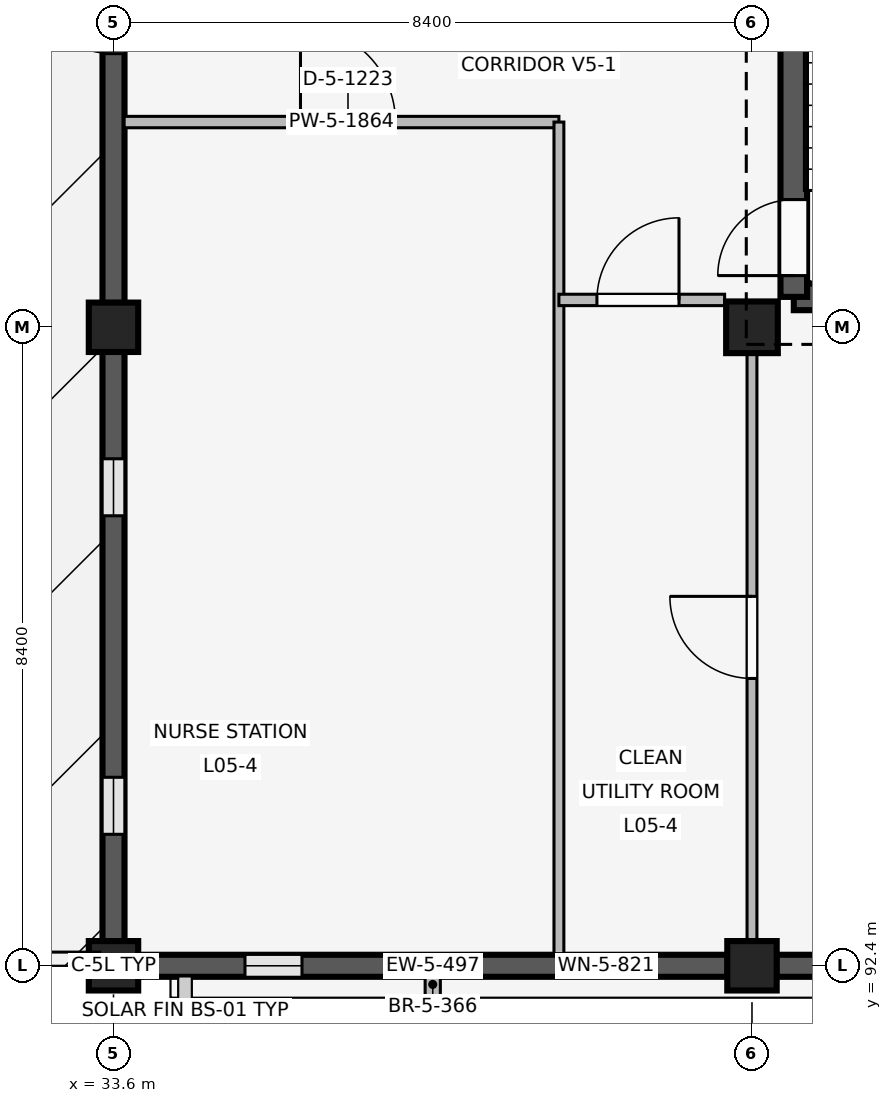
"""IFC4 building model, lengths in metres.
Left out: names, types, materials, properties, quantities, classifications, styles, units other than length and angle.
Written with IfcOpenShell. Run it as: python <this file> out.ifc"""

import sys

from ifc_helpers import new_model, si_unit, direction, frame, frame_2d, origin, origin_2d, place, context, subcontext, project, spatial, rectangle, extrude, element, fill, save


model = new_model("IFC4")
c1 = context("Model", 3, precision=1e-05, world=origin(), true_north=direction((0.0, 1.0)))
c2 = subcontext(c1, "Body", "Model", "MODEL_VIEW")
j1 = project(units=[si_unit("LENGTHUNIT", "METRE"), si_unit("PLANEANGLEUNIT", "RADIAN")], contexts=[c1])
p1 = place(None, origin())
s1 = spatial("IfcSite", under=j1, at=p1, CompositionType="ELEMENT")
p2 = place(p1, origin())
s2 = spatial("IfcBuilding", under=s1, at=p2, CompositionType="ELEMENT")
p3 = place(p2, frame((0.0, 0.0, 20.4)))
s3 = spatial("IfcBuildingStorey", under=s2, at=p3, CompositionType="ELEMENT", Elevation=20.4)
for number, where, z_axis, x_axis in (
    (1, (33.6, 92.4, 0.0), (0.0, 0.0, 1.0), (1.0, 0.0, 0.0)),
    (2, (33.6, 100.8, 0.0), (0.0, 0.0, 1.0), (1.0, 0.0, 0.0)),
    (3, (42.0, 92.4, 0.0), (0.0, 0.0, 1.0), (1.0, 0.0, 0.0)),
):
    element("IfcColumn", number, at=place(p3, frame(where, z_axis=z_axis, x_axis=x_axis)), inside=s3, PredefinedType="COLUMN", context=c2, shape_type="SweptSolid", body=[
        extrude(rectangle(XDim=0.65, YDim=0.65, at=origin_2d()), origin(), (0.0, 0.0, 1.0), 4.2),
    ])
p4 = place(p3, frame((42.0, 100.8, 0.0), z_axis=(0.0, 0.0, 1.0), x_axis=(1.0, 0.0, 0.0)))
e4 = element("IfcColumn", 4, at=p4, inside=s3, PredefinedType="COLUMN", context=c2, shape_type="SweptSolid", body=[
    extrude(rectangle(XDim=0.68, YDim=0.68, at=origin_2d()), origin(), (0.0, 0.0, 1.0), 4.2),
])
p5 = place(p3, frame((41.68, 92.4, 0.0), z_axis=(0.0, 0.0, 1.0), x_axis=(-1.0, 0.0, 0.0)))
e5 = element("IfcWall", 5, at=p5, inside=s3, PredefinedType="SOLIDWALL", context=c2, shape_type="SweptSolid", body=[
    extrude(rectangle(XDim=7.76, YDim=0.29, at=frame_2d((3.88, 0.0))), origin(), (0.0, 0.0, 1.0), 3.34),
])
p6 = place(p5, frame((1.225, 0.0, 0.85)))
e6 = element("IfcOpeningElement", 6, at=p6, cuts=e5, PredefinedType="OPENING", context=c2, shape_type="SweptSolid", body=[
    extrude(rectangle(XDim=0.75, YDim=1.85, at=frame_2d((0.375, 0.925))), frame((0.0, 0.155, 0.0), z_axis=(0.0, -1.0, 0.0), x_axis=(1.0, 0.0, 0.0)), (0.0, 0.0, 1.0), 0.31),
])
p7 = place(p5, frame((5.6, 0.0, 0.85)))
e7 = element("IfcOpeningElement", 7, at=p7, cuts=e5, PredefinedType="OPENING", context=c2, shape_type="SweptSolid", body=[
    extrude(rectangle(XDim=0.75, YDim=1.85, at=frame_2d((0.375, 0.925))), frame((0.0, 0.155, 0.0), z_axis=(0.0, -1.0, 0.0), x_axis=(1.0, 0.0, 0.0)), (0.0, 0.0, 1.0), 0.31),
])
p8 = place(p3, frame((37.8, 92.325, 0.0), z_axis=(0.0, 0.0, 1.0), x_axis=(0.0, -1.0, 0.0)))
e8 = element("IfcWall", 8, at=p8, inside=s3, PredefinedType="ELEMENTEDWALL", context=c2, shape_type="SweptSolid", body=[
    extrude(rectangle(XDim=0.34, YDim=0.2, at=frame_2d((0.17, 0.0))), origin(), (0.0, 0.0, 1.0), 3.32),
])
p9 = place(p3, frame((33.6, 92.72, 0.0), z_axis=(0.0, 0.0, 1.0), x_axis=(0.0, 1.0, 0.0)))
e9 = element("IfcWall", 9, at=p9, inside=s3, PredefinedType="SOLIDWALL", context=c2, shape_type="SweptSolid", body=[
    extrude(rectangle(XDim=7.76, YDim=0.29, at=frame_2d((3.88, 0.0))), origin(), (0.0, 0.0, 1.0), 3.34),
])
p10 = place(p9, frame((1.41, 0.0, 0.85)))
e10 = element("IfcOpeningElement", 10, at=p10, cuts=e9, PredefinedType="OPENING", context=c2, shape_type="SweptSolid", body=[
    extrude(rectangle(XDim=0.75, YDim=1.85, at=frame_2d((0.375, 0.925))), frame((0.0, 0.155, 0.0), z_axis=(0.0, -1.0, 0.0), x_axis=(1.0, 0.0, 0.0)), (0.0, 0.0, 1.0), 0.31),
])
p11 = place(p9, frame((5.6, 0.0, 0.85)))
e11 = element("IfcOpeningElement", 11, at=p11, cuts=e9, PredefinedType="OPENING", context=c2, shape_type="SweptSolid", body=[
    extrude(rectangle(XDim=0.75, YDim=1.85, at=frame_2d((0.375, 0.925))), frame((0.0, 0.155, 0.0), z_axis=(0.0, -1.0, 0.0), x_axis=(1.0, 0.0, 0.0)), (0.0, 0.0, 1.0), 0.31),
])
p12 = place(p3, frame((33.6, 101.12, 0.0), z_axis=(0.0, 0.0, 1.0), x_axis=(0.0, 1.0, 0.0)))
e12 = element("IfcWall", 12, at=p12, inside=s3, PredefinedType="SOLIDWALL", context=c2, shape_type="SweptSolid", body=[
    extrude(rectangle(XDim=7.76, YDim=0.29, at=frame_2d((3.88, 0.0))), origin(), (0.0, 0.0, 1.0), 3.34),
])
p13 = place(p12, frame((3.28, 0.0, 0.0)))
e13 = element("IfcOpeningElement", 13, at=p13, cuts=e12, PredefinedType="OPENING", context=c2, shape_type="SweptSolid", body=[
    extrude(rectangle(XDim=1.2, YDim=2.25, at=frame_2d((0.6, 1.125))), frame((0.0, 0.155, 0.0), z_axis=(0.0, -1.0, 0.0), x_axis=(1.0, 0.0, 0.0)), (0.0, 0.0, 1.0), 0.31),
])
p14 = place(p3, frame((50.08, 92.4, 0.0), z_axis=(0.0, 0.0, 1.0), x_axis=(-1.0, 0.0, 0.0)))
e14 = element("IfcWall", 14, at=p14, inside=s3, PredefinedType="SOLIDWALL", context=c2, shape_type="SweptSolid", body=[
    extrude(rectangle(XDim=7.76, YDim=0.29, at=frame_2d((3.88, 0.0))), origin(), (0.0, 0.0, 1.0), 3.34),
])
p15 = place(p14, frame((1.46, 0.0, 0.85)))
e15 = element("IfcOpeningElement", 15, at=p15, cuts=e14, PredefinedType="OPENING", context=c2, shape_type="SweptSolid", body=[
    extrude(rectangle(XDim=0.65, YDim=1.75, at=frame_2d((0.325, 0.875))), frame((0.0, 0.155, 0.0), z_axis=(0.0, -1.0, 0.0), x_axis=(1.0, 0.0, 0.0)), (0.0, 0.0, 1.0), 0.31),
])
p16 = place(p14, frame((5.65, 0.0, 0.85)))
e16 = element("IfcOpeningElement", 16, at=p16, cuts=e14, PredefinedType="OPENING", context=c2, shape_type="SweptSolid", body=[
    extrude(rectangle(XDim=0.65, YDim=1.75, at=frame_2d((0.325, 0.875))), frame((0.0, 0.155, 0.0), z_axis=(0.0, -1.0, 0.0), x_axis=(1.0, 0.0, 0.0)), (0.0, 0.0, 1.0), 0.31),
])
p17 = place(p3, frame((42.55, 101.2, 0.0), z_axis=(0.0, 0.0, 1.0), x_axis=(1.0, 0.0, 0.0)))
e17 = element("IfcWall", 17, at=p17, inside=s3, PredefinedType="SHEAR", context=c2, shape_type="SweptSolid", body=[
    extrude(rectangle(XDim=7.5, YDim=0.35, at=frame_2d((3.75, 0.0))), origin(), (0.0, 0.0, 1.0), 3.92),
])
p18 = place(p17, frame((4.85, 0.0, 0.0)))
e18 = element("IfcOpeningElement", 18, at=p18, cuts=e17, PredefinedType="OPENING", context=c2, shape_type="SweptSolid", body=[
    extrude(rectangle(XDim=1.2, YDim=2.2, at=frame_2d((0.6, 1.1))), frame((0.0, 0.185, 0.0), z_axis=(0.0, -1.0, 0.0), x_axis=(1.0, 0.0, 0.0)), (0.0, 0.0, 1.0), 0.37),
])
p19 = place(p3, frame((42.55, 101.2, 0.0), z_axis=(0.0, 0.0, 1.0), x_axis=(0.0, 1.0, 0.0)))
e19 = element("IfcWall", 19, at=p19, inside=s3, PredefinedType="SHEAR", context=c2, shape_type="SweptSolid", body=[
    extrude(rectangle(XDim=7.55, YDim=0.35, at=frame_2d((3.775, 0.0))), origin(), (0.0, 0.0, 1.0), 3.92),
])
p20 = place(p19, frame((0.28, 0.0, 0.0)))
e20 = element("IfcOpeningElement", 20, at=p20, cuts=e19, PredefinedType="OPENING", context=c2, shape_type="SweptSolid", body=[
    extrude(rectangle(XDim=1.0, YDim=2.15, at=frame_2d((0.5, 1.075))), frame((0.0, 0.185, 0.0), z_axis=(0.0, -1.0, 0.0), x_axis=(1.0, 0.0, 0.0)), (0.0, 0.0, 1.0), 0.37),
])
p21 = place(p3, frame((33.74, 103.5, 0.0), z_axis=(0.0, 0.0, 1.0), x_axis=(1.0, 0.0, 0.0)))
e21 = element("IfcWall", 21, at=p21, inside=s3, PredefinedType="PARTITIONING", context=c2, shape_type="SweptSolid", body=[
    extrude(rectangle(XDim=5.72, YDim=0.15, at=frame_2d((2.86, 0.0))), origin(), (0.0, 0.0, 1.0), 3.32),
])
p22 = place(p21, frame((2.32, 0.0, 0.0)))
e22 = element("IfcOpeningElement", 22, at=p22, cuts=e21, PredefinedType="OPENING", context=c2, shape_type="SweptSolid", body=[
    extrude(rectangle(XDim=1.25, YDim=2.2, at=frame_2d((0.625, 1.1))), frame((0.0, 0.085, 0.0), z_axis=(0.0, -1.0, 0.0), x_axis=(1.0, 0.0, 0.0)), (0.0, 0.0, 1.0), 0.17),
])
p23 = place(p3, frame((39.46, 92.56, 0.0), z_axis=(0.0, 0.0, 1.0), x_axis=(0.0, 1.0, 0.0)))
e23 = element("IfcWall", 23, at=p23, inside=s3, PredefinedType="PARTITIONING", context=c2, shape_type="SweptSolid", body=[
    extrude(rectangle(XDim=10.94, YDim=0.13, at=frame_2d((5.47, 0.0))), origin(), (0.0, 0.0, 1.0), 3.32),
])
p24 = place(p3, frame((39.46, 101.16, 0.0), z_axis=(0.0, 0.0, 1.0), x_axis=(1.0, 0.0, 0.0)))
e24 = element("IfcWall", 24, at=p24, inside=s3, PredefinedType="PARTITIONING", context=c2, shape_type="SweptSolid", body=[
    extrude(rectangle(XDim=2.18, YDim=0.15, at=frame_2d((1.09, 0.0))), origin(), (0.0, 0.0, 1.0), 3.32),
])
p25 = place(p24, frame((0.5, 0.0, 0.0)))
e25 = element("IfcOpeningElement", 25, at=p25, cuts=e24, PredefinedType="OPENING", context=c2, shape_type="SweptSolid", body=[
    extrude(rectangle(XDim=1.08, YDim=2.15, at=frame_2d((0.54, 1.075))), frame((0.0, 0.085, 0.0), z_axis=(0.0, -1.0, 0.0), x_axis=(1.0, 0.0, 0.0)), (0.0, 0.0, 1.0), 0.17),
])
p26 = place(p3, frame((42.0, 92.54, 0.0), z_axis=(0.0, 0.0, 1.0), x_axis=(0.0, 1.0, 0.0)))
e26 = element("IfcWall", 26, at=p26, inside=s3, PredefinedType="PARTITIONING", context=c2, shape_type="SweptSolid", body=[
    extrude(rectangle(XDim=8.21, YDim=0.13, at=frame_2d((4.105, 0.0))), origin(), (0.0, 0.0, 1.0), 3.32),
])
p27 = place(p26, frame((3.64, 0.0, 0.0)))
e27 = element("IfcOpeningElement", 27, at=p27, cuts=e26, PredefinedType="OPENING", context=c2, shape_type="SweptSolid", body=[
    extrude(rectangle(XDim=1.08, YDim=2.15, at=frame_2d((0.54, 1.075))), frame((0.0, 0.075, 0.0), z_axis=(0.0, -1.0, 0.0), x_axis=(1.0, 0.0, 0.0)), (0.0, 0.0, 1.0), 0.15),
])
p28 = place(p6, origin())
e28 = element("IfcWindow", 28, at=p28, inside=s3, PartitioningType="SINGLE_PANEL", PredefinedType="WINDOW", context=c2, shape_type="SweptSolid", body=[
    extrude(rectangle(XDim=0.75, YDim=1.85, at=frame_2d((0.375, 0.925))), frame((0.0, 0.03, 0.0), z_axis=(0.0, -1.0, 0.0), x_axis=(1.0, 0.0, 0.0)), (0.0, 0.0, 1.0), 0.06),
])
fill(e6, e28)
p29 = place(p7, origin())
e29 = element("IfcWindow", 29, at=p29, inside=s3, PartitioningType="SINGLE_PANEL", PredefinedType="WINDOW", context=c2, shape_type="SweptSolid", body=[
    extrude(rectangle(XDim=0.75, YDim=1.85, at=frame_2d((0.375, 0.925))), frame((0.0, 0.03, 0.0), z_axis=(0.0, -1.0, 0.0), x_axis=(1.0, 0.0, 0.0)), (0.0, 0.0, 1.0), 0.06),
])
fill(e7, e29)
p30 = place(p10, origin())
e30 = element("IfcWindow", 30, at=p30, inside=s3, PartitioningType="SINGLE_PANEL", PredefinedType="WINDOW", context=c2, shape_type="SweptSolid", body=[
    extrude(rectangle(XDim=0.75, YDim=1.85, at=frame_2d((0.375, 0.925))), frame((0.0, 0.03, 0.0), z_axis=(0.0, -1.0, 0.0), x_axis=(1.0, 0.0, 0.0)), (0.0, 0.0, 1.0), 0.06),
])
fill(e10, e30)
p31 = place(p11, origin())
e31 = element("IfcWindow", 31, at=p31, inside=s3, PartitioningType="SINGLE_PANEL", PredefinedType="WINDOW", context=c2, shape_type="SweptSolid", body=[
    extrude(rectangle(XDim=0.75, YDim=1.85, at=frame_2d((0.375, 0.925))), frame((0.0, 0.03, 0.0), z_axis=(0.0, -1.0, 0.0), x_axis=(1.0, 0.0, 0.0)), (0.0, 0.0, 1.0), 0.06),
])
fill(e11, e31)
p32 = place(p13, origin())
e32 = element("IfcDoor", 32, at=p32, inside=s3, OperationType="SINGLE_SWING_RIGHT", PredefinedType="DOOR", context=c2, shape_type="SweptSolid", body=[
    extrude(rectangle(XDim=1.2, YDim=2.25, at=frame_2d((0.6, 1.125))), frame((0.0, 0.025, 0.0), z_axis=(0.0, -1.0, 0.0), x_axis=(1.0, 0.0, 0.0)), (0.0, 0.0, 1.0), 0.05),
])
fill(e13, e32)
p33 = place(p20, origin())
e33 = element("IfcDoor", 33, at=p33, inside=s3, OperationType="SINGLE_SWING_LEFT", PredefinedType="DOOR", context=c2, shape_type="SweptSolid", body=[
    extrude(rectangle(XDim=1.0, YDim=2.15, at=frame_2d((0.5, 1.075))), frame((0.0, 0.025, 0.0), z_axis=(0.0, -1.0, 0.0), x_axis=(1.0, 0.0, 0.0)), (0.0, 0.0, 1.0), 0.05),
])
fill(e20, e33)
p34 = place(p22, origin())
e34 = element("IfcDoor", 34, at=p34, inside=s3, OperationType="SINGLE_SWING_LEFT", PredefinedType="DOOR", context=c2, shape_type="SweptSolid", body=[
    extrude(rectangle(XDim=1.25, YDim=2.2, at=frame_2d((0.625, 1.1))), frame((0.0, 0.025, 0.0), z_axis=(0.0, -1.0, 0.0), x_axis=(1.0, 0.0, 0.0)), (0.0, 0.0, 1.0), 0.05),
])
fill(e22, e34)
p35 = place(p25, origin())
e35 = element("IfcDoor", 35, at=p35, inside=s3, OperationType="SINGLE_SWING_RIGHT", PredefinedType="DOOR", context=c2, shape_type="SweptSolid", body=[
    extrude(rectangle(XDim=1.08, YDim=2.15, at=frame_2d((0.54, 1.075))), frame((0.0, 0.025, 0.0), z_axis=(0.0, -1.0, 0.0), x_axis=(1.0, 0.0, 0.0)), (0.0, 0.0, 1.0), 0.05),
])
fill(e25, e35)
p36 = place(p27, origin())
e36 = element("IfcDoor", 36, at=p36, inside=s3, OperationType="SINGLE_SWING_RIGHT", PredefinedType="DOOR", context=c2, shape_type="SweptSolid", body=[
    extrude(rectangle(XDim=1.08, YDim=2.15, at=frame_2d((0.54, 1.075))), frame((0.0, 0.025, 0.0), z_axis=(0.0, -1.0, 0.0), x_axis=(1.0, 0.0, 0.0)), (0.0, 0.0, 1.0), 0.05),
])
fill(e27, e36)
save(model, sys.argv[1])
